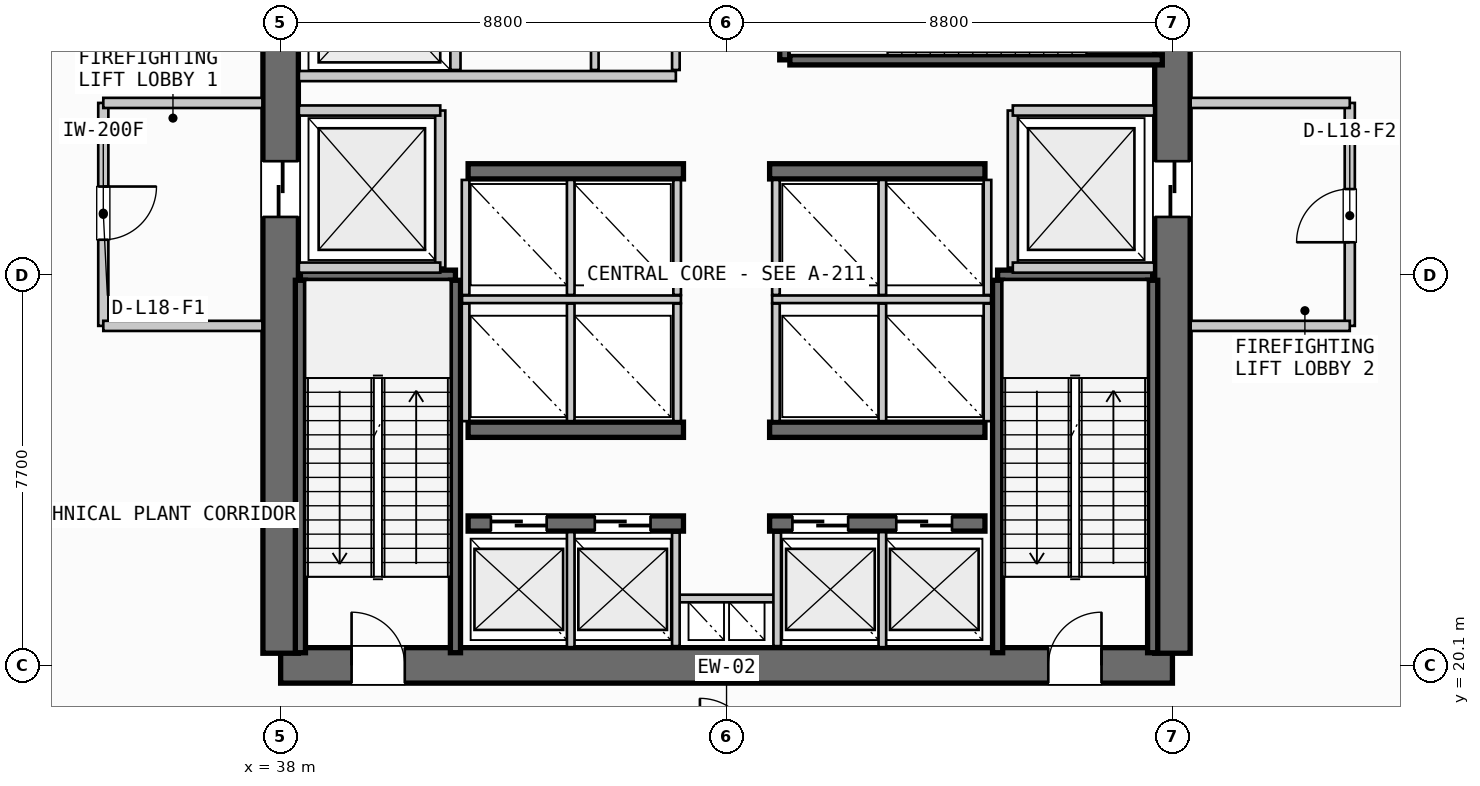
"""IFC4 building model, lengths in metres.
Left out: names, types, materials, properties, quantities, classifications, styles, units other than length and angle.
Written with IfcOpenShell. Run it as: python <this file> out.ifc"""

import sys

from ifc_helpers import new_model, si_unit, direction, frame, frame_2d, origin, place, context, subcontext, project, spatial, rectangle, extrude, source, transform, mapped, element, fill, save


model = new_model("IFC4")
c1 = context("Model", 3, precision=1e-05, world=origin(), true_north=direction((0.0, 1.0)))
c2 = subcontext(c1, "Body", "Model", "MODEL_VIEW")
j1 = project(units=[si_unit("LENGTHUNIT", "METRE"), si_unit("PLANEANGLEUNIT", "RADIAN")], contexts=[c1])
p1 = place(None, origin())
s1 = spatial("IfcSite", under=j1, at=p1, CompositionType="ELEMENT")
p2 = place(p1, origin())
s2 = spatial("IfcBuilding", under=s1, at=p2, CompositionType="ELEMENT")
p3 = place(p2, frame((0.0, 0.0, 75.2)))
s3 = spatial("IfcBuildingStorey", under=s2, at=p3, CompositionType="ELEMENT", Elevation=75.2)
p4 = place(p3, frame((38.0, 20.1, 0.0), z_axis=(0.0, 0.0, 1.0), x_axis=(1.0, 0.0, 0.0)))
e1 = element("IfcWall", 1, at=p4, inside=s3, PredefinedType="SHEAR", context=c2, shape_type="SweptSolid", body=[
    extrude(rectangle(XDim=17.6, YDim=0.7, at=frame_2d((8.8, 0.0))), origin(), (0.0, 0.0, 1.0), 4.89),
])
p5 = place(p4, frame((1.4, 0.0, 0.0)))
e2 = element("IfcOpeningElement", 2, at=p5, cuts=e1, PredefinedType="OPENING", context=c2, shape_type="SweptSolid", body=[
    extrude(rectangle(XDim=1.05, YDim=2.15, at=frame_2d((0.525, 1.075))), frame((0.0, 0.36, 0.0), z_axis=(0.0, -1.0, 0.0), x_axis=(1.0, 0.0, 0.0)), (0.0, 0.0, 1.0), 0.72),
])
p6 = place(p4, frame((15.15, 0.0, 0.0)))
e3 = element("IfcOpeningElement", 3, at=p6, cuts=e1, PredefinedType="OPENING", context=c2, shape_type="SweptSolid", body=[
    extrude(rectangle(XDim=1.05, YDim=2.15, at=frame_2d((0.525, 1.075))), frame((0.0, 0.36, 0.0), z_axis=(0.0, -1.0, 0.0), x_axis=(1.0, 0.0, 0.0)), (0.0, 0.0, 1.0), 0.72),
])
p7 = place(p3, frame((38.0, 35.26, 0.0), z_axis=(0.0, 0.0, 1.0), x_axis=(0.0, -1.0, 0.0)))
e4 = element("IfcWall", 4, at=p7, inside=s3, PredefinedType="SHEAR", context=c2, shape_type="SweptSolid", body=[
    extrude(rectangle(XDim=14.92, YDim=0.7, at=frame_2d((7.46, 0.0))), origin(), (0.0, 0.0, 1.0), 4.89),
])
p8 = place(p7, frame((5.21, 0.0, 0.0)))
e5 = element("IfcOpeningElement", 5, at=p8, cuts=e4, PredefinedType="OPENING", context=c2, shape_type="SweptSolid", body=[
    extrude(rectangle(XDim=1.1, YDim=2.2, at=frame_2d((0.55, 1.1))), frame((0.0, 0.36, 0.0), z_axis=(0.0, -1.0, 0.0), x_axis=(1.0, 0.0, 0.0)), (0.0, 0.0, 1.0), 0.72),
])
p9 = place(p3, frame((55.6, 20.34, 0.0), z_axis=(0.0, 0.0, 1.0), x_axis=(0.0, 1.0, 0.0)))
e6 = element("IfcWall", 6, at=p9, inside=s3, PredefinedType="SHEAR", context=c2, shape_type="SweptSolid", body=[
    extrude(rectangle(XDim=14.92, YDim=0.7, at=frame_2d((7.46, 0.0))), origin(), (0.0, 0.0, 1.0), 4.89),
])
p10 = place(p9, frame((12.71, 0.0, 0.0)))
e7 = element("IfcOpeningElement", 7, at=p10, cuts=e6, PredefinedType="OPENING", context=c2, shape_type="SweptSolid", body=[
    extrude(rectangle(XDim=1.05, YDim=2.15, at=frame_2d((0.525, 1.075))), frame((0.0, 0.36, 0.0), z_axis=(0.0, -1.0, 0.0), x_axis=(1.0, 0.0, 0.0)), (0.0, 0.0, 1.0), 0.72),
])
p11 = place(p9, frame((8.61, 0.0, 0.0)))
e8 = element("IfcOpeningElement", 8, at=p11, cuts=e6, PredefinedType="OPENING", context=c2, shape_type="SweptSolid", body=[
    extrude(rectangle(XDim=1.1, YDim=2.2, at=frame_2d((0.55, 1.1))), frame((0.0, 0.36, 0.0), z_axis=(0.0, -1.0, 0.0), x_axis=(1.0, 0.0, 0.0)), (0.0, 0.0, 1.0), 0.72),
])
p12 = place(p3, frame((41.7, 22.9, 0.0), z_axis=(0.0, 0.0, 1.0), x_axis=(1.0, 0.0, 0.0)))
e9 = element("IfcWall", 9, at=p12, inside=s3, PredefinedType="SHEAR", context=c2, shape_type="SweptSolid", body=[
    extrude(rectangle(XDim=4.25, YDim=0.3, at=frame_2d((2.125, 0.0))), origin(), (0.0, 0.0, 1.0), 4.89),
])
p13 = place(p12, frame((0.45, 0.0, 0.0)))
e10 = element("IfcOpeningElement", 10, at=p13, cuts=e9, PredefinedType="OPENING", context=c2, shape_type="SweptSolid", body=[
    extrude(rectangle(XDim=1.1, YDim=2.2, at=frame_2d((0.55, 1.1))), frame((0.0, 0.16, 0.0), z_axis=(0.0, -1.0, 0.0), x_axis=(1.0, 0.0, 0.0)), (0.0, 0.0, 1.0), 0.32),
])
p14 = place(p12, frame((2.5, 0.0, 0.0)))
e11 = element("IfcOpeningElement", 11, at=p14, cuts=e9, PredefinedType="OPENING", context=c2, shape_type="SweptSolid", body=[
    extrude(rectangle(XDim=1.1, YDim=2.2, at=frame_2d((0.55, 1.1))), frame((0.0, 0.16, 0.0), z_axis=(0.0, -1.0, 0.0), x_axis=(1.0, 0.0, 0.0)), (0.0, 0.0, 1.0), 0.32),
])
p15 = place(p3, frame((47.65, 22.9, 0.0), z_axis=(0.0, 0.0, 1.0), x_axis=(1.0, 0.0, 0.0)))
e12 = element("IfcWall", 12, at=p15, inside=s3, PredefinedType="SHEAR", context=c2, shape_type="SweptSolid", body=[
    extrude(rectangle(XDim=4.25, YDim=0.3, at=frame_2d((2.125, 0.0))), origin(), (0.0, 0.0, 1.0), 4.89),
])
p16 = place(p15, frame((0.45, 0.0, 0.0)))
e13 = element("IfcOpeningElement", 13, at=p16, cuts=e12, PredefinedType="OPENING", context=c2, shape_type="SweptSolid", body=[
    extrude(rectangle(XDim=1.1, YDim=2.2, at=frame_2d((0.55, 1.1))), frame((0.0, 0.16, 0.0), z_axis=(0.0, -1.0, 0.0), x_axis=(1.0, 0.0, 0.0)), (0.0, 0.0, 1.0), 0.32),
])
p17 = place(p15, frame((2.5, 0.0, 0.0)))
e14 = element("IfcOpeningElement", 14, at=p17, cuts=e12, PredefinedType="OPENING", context=c2, shape_type="SweptSolid", body=[
    extrude(rectangle(XDim=1.1, YDim=2.2, at=frame_2d((0.55, 1.1))), frame((0.0, 0.16, 0.0), z_axis=(0.0, -1.0, 0.0), x_axis=(1.0, 0.0, 0.0)), (0.0, 0.0, 1.0), 0.32),
])
for number, where, z_axis, x_axis in (
    (15, (41.7, 24.75, 0.0), (0.0, 0.0, 1.0), (1.0, 0.0, 0.0)),
    (16, (47.65, 24.75, 0.0), (0.0, 0.0, 1.0), (1.0, 0.0, 0.0)),
    (17, (41.7, 29.85, 0.0), (0.0, 0.0, 1.0), (1.0, 0.0, 0.0)),
    (18, (47.65, 29.85, 0.0), (0.0, 0.0, 1.0), (1.0, 0.0, 0.0)),
):
    element("IfcWall", number, at=place(p3, frame(where, z_axis=z_axis, x_axis=x_axis)), inside=s3, PredefinedType="SHEAR", context=c2, shape_type="SweptSolid", body=[
        extrude(rectangle(XDim=4.25, YDim=0.3, at=frame_2d((2.125, 0.0))), origin(), (0.0, 0.0, 1.0), 4.89),
    ])
p18 = place(p3, frame((38.39, 27.8, 0.0), z_axis=(0.0, 0.0, 1.0), x_axis=(1.0, 0.0, 0.0)))
e19 = element("IfcWall", 19, at=p18, inside=s3, PredefinedType="SHEAR", context=c2, shape_type="SweptSolid", body=[
    extrude(rectangle(XDim=3.06, YDim=0.2, at=frame_2d((1.53, 0.0))), origin(), (0.0, 0.0, 1.0), 4.89),
])
for number, where, z_axis, x_axis in (
    (20, (41.45, 27.7, 0.0), (0.0, 0.0, 1.0), (0.0, -1.0, 0.0)),
    (21, (38.39, 20.35, 0.0), (0.0, 0.0, 1.0), (0.0, 1.0, 0.0)),
):
    element("IfcWall", number, at=place(p3, frame(where, z_axis=z_axis, x_axis=x_axis)), inside=s3, PredefinedType="SHEAR", context=c2, shape_type="SweptSolid", body=[
        extrude(rectangle(XDim=7.35, YDim=0.2, at=frame_2d((3.675, 0.0))), origin(), (0.0, 0.0, 1.0), 4.89),
    ])
p19 = place(p3, frame((52.15, 27.8, 0.0), z_axis=(0.0, 0.0, 1.0), x_axis=(1.0, 0.0, 0.0)))
e22 = element("IfcWall", 22, at=p19, inside=s3, PredefinedType="SHEAR", context=c2, shape_type="SweptSolid", body=[
    extrude(rectangle(XDim=3.06, YDim=0.2, at=frame_2d((1.53, 0.0))), origin(), (0.0, 0.0, 1.0), 4.89),
])
for number, where, z_axis, x_axis in (
    (23, (55.21, 27.7, 0.0), (0.0, 0.0, 1.0), (0.0, -1.0, 0.0)),
    (24, (52.15, 20.35, 0.0), (0.0, 0.0, 1.0), (0.0, 1.0, 0.0)),
):
    element("IfcWall", number, at=place(p3, frame(where, z_axis=z_axis, x_axis=x_axis)), inside=s3, PredefinedType="SHEAR", context=c2, shape_type="SweptSolid", body=[
        extrude(rectangle(XDim=7.35, YDim=0.2, at=frame_2d((3.675, 0.0))), origin(), (0.0, 0.0, 1.0), 4.89),
    ])
p20 = place(p3, frame((47.95, 32.05, 0.0), z_axis=(0.0, 0.0, 1.0), x_axis=(0.0, 1.0, 0.0)))
e25 = element("IfcWall", 25, at=p20, inside=s3, PredefinedType="SHEAR", context=c2, shape_type="SweptSolid", body=[
    extrude(rectangle(XDim=3.06, YDim=0.2, at=frame_2d((1.53, 0.0))), origin(), (0.0, 0.0, 1.0), 4.89),
])
p21 = place(p3, frame((55.4, 32.05, 0.0), z_axis=(0.0, 0.0, 1.0), x_axis=(-1.0, 0.0, 0.0)))
e26 = element("IfcWall", 26, at=p21, inside=s3, PredefinedType="SHEAR", context=c2, shape_type="SweptSolid", body=[
    extrude(rectangle(XDim=7.35, YDim=0.2, at=frame_2d((3.675, 0.0))), origin(), (0.0, 0.0, 1.0), 4.89),
])
p22 = place(p3, frame((45.8, 21.42, 0.0), z_axis=(0.0, 0.0, 1.0), x_axis=(1.0, 0.0, 0.0)))
e27 = element("IfcWall", 27, at=p22, inside=s3, PredefinedType="PARTITIONING", context=c2, shape_type="SweptSolid", body=[
    extrude(rectangle(XDim=2.0, YDim=0.15, at=frame_2d((1.0, 0.0))), origin(), (0.0, 0.0, 1.0), 4.265),
])
for number, where, z_axis, x_axis in (
    (28, (45.8, 20.48, 0.0), (0.0, 0.0, 1.0), (0.0, 1.0, 0.0)),
    (29, (47.8, 20.48, 0.0), (0.0, 0.0, 1.0), (0.0, 1.0, 0.0)),
):
    element("IfcWall", number, at=place(p3, frame(where, z_axis=z_axis, x_axis=x_axis)), inside=s3, PredefinedType="PARTITIONING", context=c2, shape_type="SweptSolid", body=[
        extrude(rectangle(XDim=2.24, YDim=0.15, at=frame_2d((1.12, 0.0))), origin(), (0.0, 0.0, 1.0), 4.265),
    ])
p23 = place(p3, frame((41.15, 27.95, 0.0), z_axis=(0.0, 0.0, 1.0), x_axis=(0.0, 1.0, 0.0)))
e30 = element("IfcWall", 30, at=p23, inside=s3, PredefinedType="PARTITIONING", context=c2, shape_type="SweptSolid", body=[
    extrude(rectangle(XDim=3.1, YDim=0.2, at=frame_2d((1.55, 0.0))), origin(), (0.0, 0.0, 1.0), 4.265),
])
for number, where, z_axis, x_axis in (
    (31, (38.36, 27.95, 0.0), (0.0, 0.0, 1.0), (1.0, 0.0, 0.0)),
    (32, (38.36, 31.05, 0.0), (0.0, 0.0, 1.0), (1.0, 0.0, 0.0)),
):
    element("IfcWall", number, at=place(p3, frame(where, z_axis=z_axis, x_axis=x_axis)), inside=s3, PredefinedType="PARTITIONING", context=c2, shape_type="SweptSolid", body=[
        extrude(rectangle(XDim=2.79, YDim=0.2, at=frame_2d((1.395, 0.0))), origin(), (0.0, 0.0, 1.0), 4.265),
    ])
p24 = place(p3, frame((34.5, 31.2, 0.0), z_axis=(0.0, 0.0, 1.0), x_axis=(0.0, -1.0, 0.0)))
e33 = element("IfcWall", 33, at=p24, inside=s3, PredefinedType="PARTITIONING", context=c2, shape_type="SweptSolid", body=[
    extrude(rectangle(XDim=4.4, YDim=0.2, at=frame_2d((2.2, 0.0))), origin(), (0.0, 0.0, 1.0), 4.265),
])
p25 = place(p24, frame((1.65, 0.0, 0.0)))
e34 = element("IfcOpeningElement", 34, at=p25, cuts=e33, PredefinedType="OPENING", context=c2, shape_type="SweptSolid", body=[
    extrude(rectangle(XDim=1.05, YDim=2.15, at=frame_2d((0.525, 1.075))), frame((0.0, 0.11, 0.0), z_axis=(0.0, -1.0, 0.0), x_axis=(1.0, 0.0, 0.0)), (0.0, 0.0, 1.0), 0.22),
])
for number, where, z_axis, x_axis in (
    (35, (34.5, 26.8, 0.0), (0.0, 0.0, 1.0), (1.0, 0.0, 0.0)),
    (36, (34.5, 31.2, 0.0), (0.0, 0.0, 1.0), (1.0, 0.0, 0.0)),
):
    element("IfcWall", number, at=place(p3, frame(where, z_axis=z_axis, x_axis=x_axis)), inside=s3, PredefinedType="PARTITIONING", context=c2, shape_type="SweptSolid", body=[
        extrude(rectangle(XDim=3.14, YDim=0.2, at=frame_2d((1.57, 0.0))), origin(), (0.0, 0.0, 1.0), 4.265),
    ])
p26 = place(p3, frame((52.45, 27.95, 0.0), z_axis=(0.0, 0.0, 1.0), x_axis=(0.0, 1.0, 0.0)))
e37 = element("IfcWall", 37, at=p26, inside=s3, PredefinedType="PARTITIONING", context=c2, shape_type="SweptSolid", body=[
    extrude(rectangle(XDim=3.1, YDim=0.2, at=frame_2d((1.55, 0.0))), origin(), (0.0, 0.0, 1.0), 4.265),
])
for number, where, z_axis, x_axis in (
    (38, (52.45, 27.95, 0.0), (0.0, 0.0, 1.0), (1.0, 0.0, 0.0)),
    (39, (52.45, 31.05, 0.0), (0.0, 0.0, 1.0), (1.0, 0.0, 0.0)),
):
    element("IfcWall", number, at=place(p3, frame(where, z_axis=z_axis, x_axis=x_axis)), inside=s3, PredefinedType="PARTITIONING", context=c2, shape_type="SweptSolid", body=[
        extrude(rectangle(XDim=2.79, YDim=0.2, at=frame_2d((1.395, 0.0))), origin(), (0.0, 0.0, 1.0), 4.265),
    ])
p27 = place(p3, frame((59.1, 26.8, 0.0), z_axis=(0.0, 0.0, 1.0), x_axis=(0.0, 1.0, 0.0)))
e40 = element("IfcWall", 40, at=p27, inside=s3, PredefinedType="PARTITIONING", context=c2, shape_type="SweptSolid", body=[
    extrude(rectangle(XDim=4.4, YDim=0.2, at=frame_2d((2.2, 0.0))), origin(), (0.0, 0.0, 1.0), 4.265),
])
p28 = place(p27, frame((1.65, 0.0, 0.0)))
e41 = element("IfcOpeningElement", 41, at=p28, cuts=e40, PredefinedType="OPENING", context=c2, shape_type="SweptSolid", body=[
    extrude(rectangle(XDim=1.05, YDim=2.15, at=frame_2d((0.525, 1.075))), frame((0.0, 0.11, 0.0), z_axis=(0.0, -1.0, 0.0), x_axis=(1.0, 0.0, 0.0)), (0.0, 0.0, 1.0), 0.22),
])
for number, where, z_axis, x_axis in (
    (42, (55.96, 26.8, 0.0), (0.0, 0.0, 1.0), (1.0, 0.0, 0.0)),
    (43, (55.96, 31.2, 0.0), (0.0, 0.0, 1.0), (1.0, 0.0, 0.0)),
):
    element("IfcWall", number, at=place(p3, frame(where, z_axis=z_axis, x_axis=x_axis)), inside=s3, PredefinedType="PARTITIONING", context=c2, shape_type="SweptSolid", body=[
        extrude(rectangle(XDim=3.14, YDim=0.2, at=frame_2d((1.57, 0.0))), origin(), (0.0, 0.0, 1.0), 4.265),
    ])
for number, where, z_axis, x_axis in (
    (44, (43.725, 20.46, 0.0), (0.0, 0.0, 1.0), (0.0, 1.0, 0.0)),
    (45, (49.875, 20.46, 0.0), (0.0, 0.0, 1.0), (0.0, 1.0, 0.0)),
):
    element("IfcWall", number, at=place(p3, frame(where, z_axis=z_axis, x_axis=x_axis)), inside=s3, PredefinedType="PARTITIONING", context=c2, shape_type="SweptSolid", body=[
        extrude(rectangle(XDim=2.27, YDim=0.15, at=frame_2d((1.135, 0.0))), origin(), (0.0, 0.0, 1.0), 4.265),
    ])
p29 = place(p3, frame((41.58, 27.325, 0.0), z_axis=(0.0, 0.0, 1.0), x_axis=(1.0, 0.0, 0.0)))
e46 = element("IfcWall", 46, at=p29, inside=s3, PredefinedType="PARTITIONING", context=c2, shape_type="SweptSolid", body=[
    extrude(rectangle(XDim=4.32, YDim=0.15, at=frame_2d((2.16, 0.0))), origin(), (0.0, 0.0, 1.0), 4.265),
])
p30 = place(p3, frame((47.7, 27.325, 0.0), z_axis=(0.0, 0.0, 1.0), x_axis=(1.0, 0.0, 0.0)))
e47 = element("IfcWall", 47, at=p30, inside=s3, PredefinedType="PARTITIONING", context=c2, shape_type="SweptSolid", body=[
    extrude(rectangle(XDim=4.32, YDim=0.15, at=frame_2d((2.16, 0.0))), origin(), (0.0, 0.0, 1.0), 4.265),
])
for number, where, z_axis, x_axis in (
    (48, (41.65, 24.92, 0.0), (0.0, 0.0, 1.0), (0.0, 1.0, 0.0)),
    (49, (43.725, 24.92, 0.0), (0.0, 0.0, 1.0), (0.0, 1.0, 0.0)),
    (50, (45.825, 24.92, 0.0), (0.0, 0.0, 1.0), (0.0, 1.0, 0.0)),
    (51, (47.775, 24.92, 0.0), (0.0, 0.0, 1.0), (0.0, 1.0, 0.0)),
    (52, (49.875, 24.92, 0.0), (0.0, 0.0, 1.0), (0.0, 1.0, 0.0)),
    (53, (51.95, 24.92, 0.0), (0.0, 0.0, 1.0), (0.0, 1.0, 0.0)),
):
    element("IfcWall", number, at=place(p3, frame(where, z_axis=z_axis, x_axis=x_axis)), inside=s3, PredefinedType="PARTITIONING", context=c2, shape_type="SweptSolid", body=[
        extrude(rectangle(XDim=2.32, YDim=0.15, at=frame_2d((1.16, 0.0))), origin(), (0.0, 0.0, 1.0), 4.265),
    ])
for number, where, z_axis, x_axis in (
    (54, (41.65, 27.41, 0.0), (0.0, 0.0, 1.0), (0.0, 1.0, 0.0)),
    (55, (43.725, 27.41, 0.0), (0.0, 0.0, 1.0), (0.0, 1.0, 0.0)),
    (56, (45.825, 27.41, 0.0), (0.0, 0.0, 1.0), (0.0, 1.0, 0.0)),
    (57, (47.775, 27.41, 0.0), (0.0, 0.0, 1.0), (0.0, 1.0, 0.0)),
    (58, (49.875, 27.41, 0.0), (0.0, 0.0, 1.0), (0.0, 1.0, 0.0)),
    (59, (51.95, 27.41, 0.0), (0.0, 0.0, 1.0), (0.0, 1.0, 0.0)),
):
    element("IfcWall", number, at=place(p3, frame(where, z_axis=z_axis, x_axis=x_axis)), inside=s3, PredefinedType="PARTITIONING", context=c2, shape_type="SweptSolid", body=[
        extrude(rectangle(XDim=2.27, YDim=0.15, at=frame_2d((1.135, 0.0))), origin(), (0.0, 0.0, 1.0), 4.265),
    ])
p31 = place(p3, frame((41.45, 31.85, 0.0), z_axis=(0.0, 0.0, 1.0), x_axis=(0.0, 1.0, 0.0)))
e60 = element("IfcWall", 60, at=p31, inside=s3, PredefinedType="PARTITIONING", context=c2, shape_type="SweptSolid", body=[
    extrude(rectangle(XDim=3.29, YDim=0.2, at=frame_2d((1.645, 0.0))), origin(), (0.0, 0.0, 1.0), 4.265),
])
p32 = place(p3, frame((38.36, 31.73, 0.0), z_axis=(0.0, 0.0, 1.0), x_axis=(1.0, 0.0, 0.0)))
e61 = element("IfcWall", 61, at=p32, inside=s3, PredefinedType="PARTITIONING", context=c2, shape_type="SweptSolid", body=[
    extrude(rectangle(XDim=7.44, YDim=0.2, at=frame_2d((3.72, 0.0))), origin(), (0.0, 0.0, 1.0), 4.265),
])
p33 = place(p3, frame((45.8, 31.85, 0.0), z_axis=(0.0, 0.0, 1.0), x_axis=(0.0, 1.0, 0.0)))
e62 = element("IfcWall", 62, at=p33, inside=s3, PredefinedType="PARTITIONING", context=c2, shape_type="SweptSolid", body=[
    extrude(rectangle(XDim=3.29, YDim=0.15, at=frame_2d((1.645, 0.0))), origin(), (0.0, 0.0, 1.0), 4.265),
])
p34 = place(p3, frame((44.2, 31.85, 0.0), z_axis=(0.0, 0.0, 1.0), x_axis=(0.0, 1.0, 0.0)))
e63 = element("IfcWall", 63, at=p34, inside=s3, PredefinedType="PLUMBINGWALL", context=c2, shape_type="SweptSolid", body=[
    extrude(rectangle(XDim=3.29, YDim=0.15, at=frame_2d((1.645, 0.0))), origin(), (0.0, 0.0, 1.0), 4.265),
])
m1 = source(origin(), c2, "Body", "SweptSolid", [
    extrude(rectangle(XDim=1.05, YDim=2.15, at=frame_2d((0.525, 1.075))), frame((0.0, 0.025, 0.0), z_axis=(0.0, -1.0, 0.0), x_axis=(1.0, 0.0, 0.0)), (0.0, 0.0, 1.0), 0.05),
])
p35 = place(p5, origin())
e64 = element("IfcDoor", 64, at=p35, inside=s3, OperationType="SINGLE_SWING_LEFT", PredefinedType="DOOR", context=c2, shape_type="MappedRepresentation", body=[
    mapped(m1, transform((0.0, 0.0, 0.0), scale=1.0)),
])
fill(e2, e64)
p36 = place(p6, origin())
e65 = element("IfcDoor", 65, at=p36, inside=s3, OperationType="SINGLE_SWING_RIGHT", PredefinedType="DOOR", context=c2, shape_type="MappedRepresentation", body=[
    mapped(m1, transform((0.0, 0.0, 0.0), scale=1.0)),
])
fill(e3, e65)
m2 = source(origin(), c2, "Body", "SweptSolid", [
    extrude(rectangle(XDim=1.1, YDim=2.2, at=frame_2d((0.55, 1.1))), frame((0.0, 0.025, 0.0), z_axis=(0.0, -1.0, 0.0), x_axis=(1.0, 0.0, 0.0)), (0.0, 0.0, 1.0), 0.05),
])
p37 = place(p8, origin())
e66 = element("IfcDoor", 66, at=p37, inside=s3, OperationType="SLIDING_TO_LEFT", PredefinedType="DOOR", context=c2, shape_type="MappedRepresentation", body=[
    mapped(m2, transform((0.0, 0.0, 0.0), scale=1.0)),
])
fill(e5, e66)
p38 = place(p11, origin())
e67 = element("IfcDoor", 67, at=p38, inside=s3, OperationType="SLIDING_TO_RIGHT", PredefinedType="DOOR", context=c2, shape_type="MappedRepresentation", body=[
    mapped(m2, transform((0.0, 0.0, 0.0), scale=1.0)),
])
fill(e8, e67)
p39 = place(p13, origin())
e68 = element("IfcDoor", 68, at=p39, inside=s3, OperationType="SLIDING_TO_LEFT", PredefinedType="DOOR", context=c2, shape_type="MappedRepresentation", body=[
    mapped(m2, transform((0.0, 0.0, 0.0), scale=1.0)),
])
fill(e10, e68)
p40 = place(p14, origin())
e69 = element("IfcDoor", 69, at=p40, inside=s3, OperationType="SLIDING_TO_LEFT", PredefinedType="DOOR", context=c2, shape_type="MappedRepresentation", body=[
    mapped(m2, transform((0.0, 0.0, 0.0), scale=1.0)),
])
fill(e11, e69)
p41 = place(p16, origin())
e70 = element("IfcDoor", 70, at=p41, inside=s3, OperationType="SLIDING_TO_LEFT", PredefinedType="DOOR", context=c2, shape_type="MappedRepresentation", body=[
    mapped(m2, transform((0.0, 0.0, 0.0), scale=1.0)),
])
fill(e13, e70)
p42 = place(p17, origin())
e71 = element("IfcDoor", 71, at=p42, inside=s3, OperationType="SLIDING_TO_LEFT", PredefinedType="DOOR", context=c2, shape_type="MappedRepresentation", body=[
    mapped(m2, transform((0.0, 0.0, 0.0), scale=1.0)),
])
fill(e14, e71)
p43 = place(p25, origin())
e72 = element("IfcDoor", 72, at=p43, inside=s3, OperationType="SINGLE_SWING_LEFT", PredefinedType="DOOR", context=c2, shape_type="MappedRepresentation", body=[
    mapped(m1, transform((0.0, 0.0, 0.0), scale=1.0)),
])
fill(e34, e72)
p44 = place(p28, origin())
e73 = element("IfcDoor", 73, at=p44, inside=s3, OperationType="SINGLE_SWING_LEFT", PredefinedType="DOOR", context=c2, shape_type="MappedRepresentation", body=[
    mapped(m1, transform((0.0, 0.0, 0.0), scale=1.0)),
])
fill(e41, e73)
save(model, sys.argv[1])
